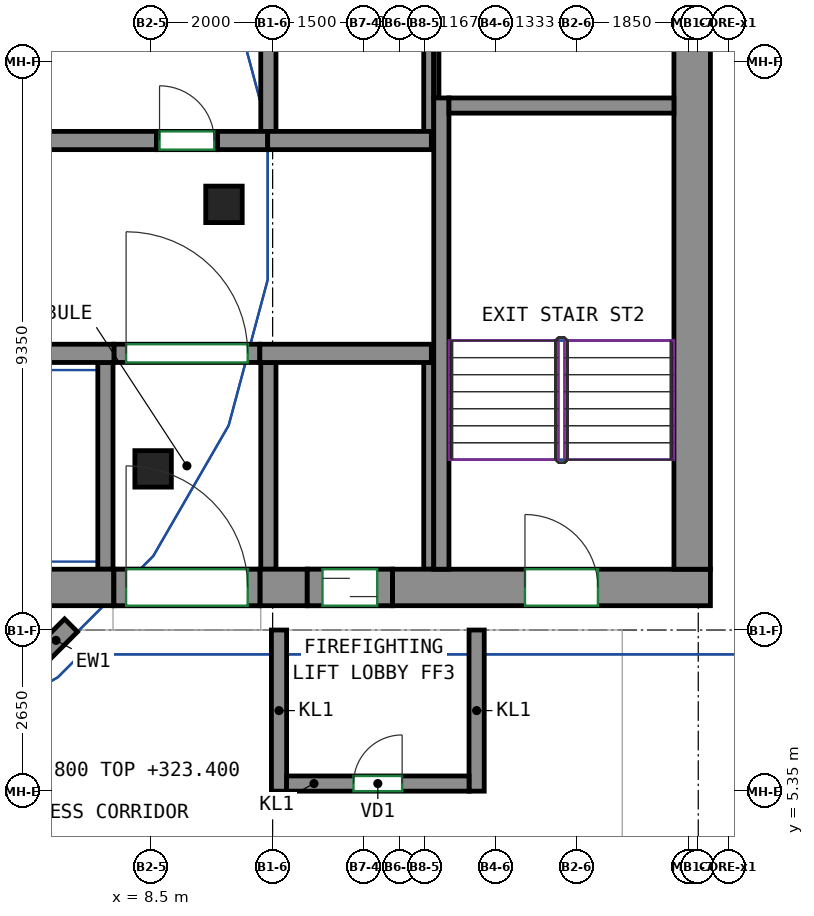
"""IFC4 building model, lengths in metres.
Left out: names, types, materials, properties, quantities, classifications, styles, units other than length and angle.
Written with IfcOpenShell. Run it as: python <this file> out.ifc"""

import sys

from ifc_helpers import new_model, si_unit, direction, frame, frame_2d, origin, origin_2d, place, context, subcontext, project, spatial, rectangle, extrude, source, transform, mapped, element, fill, save


model = new_model("IFC4")
c1 = context("Model", 3, precision=1e-05, world=origin(), true_north=direction((0.0, 1.0)))
c2 = subcontext(c1, "Body", "Model", "MODEL_VIEW")
j1 = project(units=[si_unit("LENGTHUNIT", "METRE"), si_unit("PLANEANGLEUNIT", "RADIAN")], contexts=[c1])
p1 = place(None, origin())
s1 = spatial("IfcSite", under=j1, at=p1, CompositionType="ELEMENT")
p2 = place(p1, origin())
s2 = spatial("IfcBuilding", under=s1, at=p2, CompositionType="ELEMENT")
p3 = place(p2, frame((0.0, 0.0, 318.8)))
s3 = spatial("IfcBuildingStorey", under=s2, at=p3, CompositionType="ELEMENT", Elevation=318.8)
m1 = source(origin(), c2, "Body", "SweptSolid", [
    extrude(rectangle(XDim=0.6, YDim=0.6, at=origin_2d()), origin(), (0.0, 0.0, 1.0), 4.6),
])
for number, where, z_axis, x_axis in (
    (1, (9.7, 15.0, 0.0), (0.0, 0.0, 1.0), (1.0, 0.0, 0.0)),
    (2, (8.534, 10.65, 0.0), (0.0, 0.0, 1.0), (1.0, 0.0, 0.0)),
):
    element("IfcColumn", number, at=place(p3, frame(where, z_axis=z_axis, x_axis=x_axis)), inside=s3, PredefinedType="COLUMN", context=c2, shape_type="MappedRepresentation", body=[
        mapped(m1, transform((0.0, 0.0, 0.0))),
    ])
m2 = source(origin(), c2, "Body", "SweptSolid", [
    extrude(rectangle(XDim=14.18, YDim=0.6, at=frame_2d((7.09, 0.0))), origin(), (0.0, 0.0, 1.0), 4.6),
])
p4 = place(p3, frame((-6.29, 8.7, 0.0), z_axis=(0.0, 0.0, 1.0), x_axis=(1.0, 0.0, 0.0)))
e3 = element("IfcWall", 3, at=p4, inside=s3, PredefinedType="SHEAR", context=c2, shape_type="MappedRepresentation", body=[
    mapped(m2, transform((0.0, 0.0, 0.0))),
])
m3 = source(origin(), c2, "Body", "SweptSolid", [
    extrude(rectangle(XDim=0.78, YDim=0.6, at=frame_2d((0.39, 0.0))), origin(), (0.0, 0.0, 1.0), 5.0),
])
p5 = place(p3, frame((10.29, 8.7, -0.4), z_axis=(0.0, 0.0, 1.0), x_axis=(1.0, 0.0, 0.0)))
e4 = element("IfcWall", 4, at=p5, inside=s3, PredefinedType="SHEAR", context=c2, shape_type="MappedRepresentation", body=[
    mapped(m3, transform((0.0, 0.0, 0.0))),
])
m4 = source(origin(), c2, "Body", "SweptSolid", [
    extrude(rectangle(XDim=5.23, YDim=0.6, at=frame_2d((2.615, 0.0))), origin(), (0.0, 0.0, 1.0), 5.0),
])
p6 = place(p3, frame((12.47, 8.7, -0.4), z_axis=(0.0, 0.0, 1.0), x_axis=(1.0, 0.0, 0.0)))
e5 = element("IfcWall", 5, at=p6, inside=s3, PredefinedType="SHEAR", context=c2, shape_type="MappedRepresentation", body=[
    mapped(m4, transform((0.0, 0.0, 0.0))),
])
p7 = place(p6, frame((2.18, 0.0, 0.4)))
e6 = element("IfcOpeningElement", 6, at=p7, cuts=e5, PredefinedType="OPENING", context=c2, shape_type="SweptSolid", body=[
    extrude(rectangle(XDim=1.2, YDim=2.1, at=frame_2d((0.6, 1.05))), frame((0.0, 0.31, 0.0), z_axis=(0.0, -1.0, 0.0), x_axis=(1.0, 0.0, 0.0)), (0.0, 0.0, 1.0), 0.62),
])
m5 = source(origin(), c2, "Body", "SweptSolid", [
    extrude(rectangle(XDim=12.0, YDim=0.6, at=frame_2d((6.0, 0.0))), origin(), (0.0, 0.0, 1.0), 5.0),
])
p8 = place(p3, frame((17.4, 9.0, -0.4), z_axis=(0.0, 0.0, 1.0), x_axis=(0.0, 1.0, 0.0)))
e7 = element("IfcWall", 7, at=p8, inside=s3, PredefinedType="SHEAR", context=c2, shape_type="MappedRepresentation", body=[
    mapped(m5, transform((0.0, 0.0, 0.0))),
])
m6 = source(origin(), c2, "Body", "SweptSolid", [
    extrude(rectangle(XDim=7.75, YDim=0.25, at=frame_2d((3.875, 0.0))), origin(), (0.0, 0.0, 1.0), 5.0),
])
p9 = place(p3, frame((13.275, 9.0, -0.4), z_axis=(0.0, 0.0, 1.0), x_axis=(0.0, 1.0, 0.0)))
e8 = element("IfcWall", 8, at=p9, inside=s3, PredefinedType="SHEAR", context=c2, shape_type="MappedRepresentation", body=[
    mapped(m6, transform((0.0, 0.0, 0.0))),
])
m7 = source(origin(), c2, "Body", "SweptSolid", [
    extrude(rectangle(XDim=3.7, YDim=0.25, at=frame_2d((1.85, 0.0))), origin(), (0.0, 0.0, 1.0), 5.0),
])
p10 = place(p3, frame((13.4, 16.625, -0.4), z_axis=(0.0, 0.0, 1.0), x_axis=(1.0, 0.0, 0.0)))
e9 = element("IfcWall", 9, at=p10, inside=s3, PredefinedType="SHEAR", context=c2, shape_type="MappedRepresentation", body=[
    mapped(m7, transform((0.0, 0.0, 0.0))),
])
m8 = source(origin(), c2, "Body", "SweptSolid", [
    extrude(rectangle(XDim=15.984, YDim=0.3, at=frame_2d((7.992, 0.0))), origin(), (0.0, 0.0, 1.0), 4.6),
])
p11 = place(p3, frame((-8.094, 12.55, 0.0), z_axis=(0.0, 0.0, 1.0), x_axis=(1.0, 0.0, 0.0)))
e10 = element("IfcWall", 10, at=p11, inside=s3, PredefinedType="SHEAR", context=c2, shape_type="MappedRepresentation", body=[
    mapped(m8, transform((0.0, 0.0, 0.0))),
])
m9 = source(origin(), c2, "Body", "SweptSolid", [
    extrude(rectangle(XDim=2.82, YDim=0.3, at=frame_2d((1.41, 0.0))), origin(), (0.0, 0.0, 1.0), 5.0),
])
p12 = place(p3, frame((10.29, 12.55, -0.4), z_axis=(0.0, 0.0, 1.0), x_axis=(1.0, 0.0, 0.0)))
e11 = element("IfcWall", 11, at=p12, inside=s3, PredefinedType="SHEAR", context=c2, shape_type="MappedRepresentation", body=[
    mapped(m9, transform((0.0, 0.0, 0.0))),
])
m10 = source(origin(), c2, "Body", "SweptSolid", [
    extrude(rectangle(XDim=17.009, YDim=0.3, at=frame_2d((8.504, 0.0))), origin(), (0.0, 0.0, 1.0), 4.6),
])
p13 = place(p3, frame((-8.419, 16.05, 0.0), z_axis=(0.0, 0.0, 1.0), x_axis=(1.0, 0.0, 0.0)))
e12 = element("IfcWall", 12, at=p13, inside=s3, PredefinedType="SHEAR", context=c2, shape_type="MappedRepresentation", body=[
    mapped(m10, transform((0.0, 0.0, 0.0))),
])
m11 = source(origin(), c2, "Body", "SweptSolid", [
    extrude(rectangle(XDim=0.829, YDim=0.3, at=frame_2d((0.414, 0.0))), origin(), (0.0, 0.0, 1.0), 4.6),
])
p14 = place(p3, frame((9.59, 16.05, 0.0), z_axis=(0.0, 0.0, 1.0), x_axis=(1.0, 0.0, 0.0)))
e13 = element("IfcWall", 13, at=p14, inside=s3, PredefinedType="SHEAR", context=c2, shape_type="MappedRepresentation", body=[
    mapped(m11, transform((0.0, 0.0, 0.0))),
])
m12 = source(origin(), c2, "Body", "SweptSolid", [
    extrude(rectangle(XDim=2.691, YDim=0.3, at=frame_2d((1.346, 0.0))), origin(), (0.0, 0.0, 1.0), 5.0),
])
p15 = place(p3, frame((10.419, 16.05, -0.4), z_axis=(0.0, 0.0, 1.0), x_axis=(1.0, 0.0, 0.0)))
e14 = element("IfcWall", 14, at=p15, inside=s3, PredefinedType="SHEAR", context=c2, shape_type="MappedRepresentation", body=[
    mapped(m12, transform((0.0, 0.0, 0.0))),
])
m13 = source(origin(), c2, "Body", "SweptSolid", [
    extrude(rectangle(XDim=2.4, YDim=0.6, at=frame_2d((1.2, 0.0))), origin(), (0.0, 0.0, 1.0), 0.4),
])
p16 = place(p3, frame((7.89, 8.7, 4.2), z_axis=(0.0, 0.0, 1.0), x_axis=(1.0, 0.0, 0.0)))
e15 = element("IfcWall", 15, at=p16, inside=s3, PredefinedType="SHEAR", context=c2, shape_type="MappedRepresentation", body=[
    mapped(m13, transform((0.0, 0.0, 0.0))),
])
m14 = source(origin(), c2, "Body", "SweptSolid", [
    extrude(rectangle(XDim=1.4, YDim=0.6, at=frame_2d((0.7, 0.0))), origin(), (0.0, 0.0, 1.0), 0.65),
])
p17 = place(p3, frame((11.07, 8.7, 3.95), z_axis=(0.0, 0.0, 1.0), x_axis=(1.0, 0.0, 0.0)))
e16 = element("IfcWall", 16, at=p17, inside=s3, PredefinedType="SHEAR", context=c2, shape_type="MappedRepresentation", body=[
    mapped(m14, transform((0.0, 0.0, 0.0))),
])
m15 = source(origin(), c2, "Body", "SweptSolid", [
    extrude(rectangle(XDim=1.0, YDim=0.3, at=frame_2d((0.5, 0.0))), origin(), (0.0, 0.0, 1.0), 1.35),
])
p18 = place(p3, frame((8.59, 16.05, 3.25), z_axis=(0.0, 0.0, 1.0), x_axis=(1.0, 0.0, 0.0)))
e17 = element("IfcWall", 17, at=p18, inside=s3, PredefinedType="SHEAR", context=c2, shape_type="MappedRepresentation", body=[
    mapped(m15, transform((0.0, 0.0, 0.0))),
])
m16 = source(origin(), c2, "Body", "SweptSolid", [
    extrude(rectangle(XDim=0.697, YDim=0.3, at=frame_2d((0.349, 0.0))), origin(), (0.0, 0.0, 1.0), 1.2),
])
p19 = place(p3, frame((6.691, 7.583, 0.0), z_axis=(0.0, 0.0, 1.0), x_axis=(0.706931689754, 0.707281829274, 0.0)))
e18 = element("IfcWall", 18, at=p19, inside=s3, PredefinedType="SOLIDWALL", context=c2, shape_type="MappedRepresentation", body=[
    mapped(m16, transform((0.0, 0.0, 0.0))),
])
m17 = source(origin(), c2, "Body", "SweptSolid", [
    extrude(rectangle(XDim=2.4, YDim=0.3, at=frame_2d((1.2, 0.0))), origin(), (0.0, 0.0, 1.0), 4.6),
])
p20 = place(p3, frame((7.89, 12.55, 0.0), z_axis=(0.0, 0.0, 1.0), x_axis=(1.0, 0.0, 0.0)))
e19 = element("IfcWall", 19, at=p20, inside=s3, PredefinedType="PARTITIONING", context=c2, shape_type="MappedRepresentation", body=[
    mapped(m17, transform((0.0, 0.0, 0.0))),
])
p21 = place(p20, frame((0.2, 0.0, 0.0)))
e20 = element("IfcOpeningElement", 20, at=p21, cuts=e19, PredefinedType="OPENING", context=c2, shape_type="SweptSolid", body=[
    extrude(rectangle(XDim=2.0, YDim=2.1, at=frame_2d((1.0, 1.05))), frame((0.0, 0.16, 0.0), z_axis=(0.0, -1.0, 0.0), x_axis=(1.0, 0.0, 0.0)), (0.0, 0.0, 1.0), 0.32),
])
m18 = source(origin(), c2, "Body", "SweptSolid", [
    extrude(rectangle(XDim=2.65, YDim=0.25, at=frame_2d((1.325, 0.0))), origin(), (0.0, 0.0, 1.0), 4.6),
])
for number, where, z_axis, x_axis in (
    (21, (10.605, 5.35, 0.0), (0.0, 0.0, 1.0), (0.0, 1.0, 0.0)),
    (22, (13.855, 5.35, 0.0), (0.0, 0.0, 1.0), (0.0, 1.0, 0.0)),
):
    element("IfcWall", number, at=place(p3, frame(where, z_axis=z_axis, x_axis=x_axis)), inside=s3, PredefinedType="PARTITIONING", context=c2, shape_type="MappedRepresentation", body=[
        mapped(m18, transform((0.0, 0.0, 0.0))),
    ])
m19 = source(origin(), c2, "Body", "SweptSolid", [
    extrude(rectangle(XDim=3.0, YDim=0.25, at=frame_2d((1.5, 0.0))), origin(), (0.0, 0.0, 1.0), 4.6),
])
p22 = place(p3, frame((10.73, 5.475, 0.0), z_axis=(0.0, 0.0, 1.0), x_axis=(1.0, 0.0, 0.0)))
e23 = element("IfcWall", 23, at=p22, inside=s3, PredefinedType="PARTITIONING", context=c2, shape_type="MappedRepresentation", body=[
    mapped(m19, transform((0.0, 0.0, 0.0))),
])
p23 = place(p22, frame((1.1, 0.0, 0.0)))
e24 = element("IfcOpeningElement", 24, at=p23, cuts=e23, PredefinedType="OPENING", context=c2, shape_type="SweptSolid", body=[
    extrude(rectangle(XDim=0.8, YDim=2.0, at=frame_2d((0.4, 1.0))), frame((0.0, 0.135, 0.0), z_axis=(0.0, -1.0, 0.0), x_axis=(1.0, 0.0, 0.0)), (0.0, 0.0, 1.0), 0.27),
])
m20 = source(origin(), c2, "Body", "SweptSolid", [
    extrude(rectangle(XDim=3.275, YDim=0.165, at=frame_2d((1.638, 0.0))), origin(), (0.0, 0.0, 1.0), 4.6),
])
p24 = place(p3, frame((13.067, 16.2, 0.0), z_axis=(0.0, 0.0, 1.0), x_axis=(0.0, 1.0, 0.0)))
e25 = element("IfcWall", 25, at=p24, inside=s3, PredefinedType="PARTITIONING", context=c2, shape_type="MappedRepresentation", body=[
    mapped(m20, transform((0.0, 0.0, 0.0))),
])
m21 = source(origin(), c2, "Body", "SweptSolid", [
    extrude(rectangle(XDim=3.275, YDim=0.25, at=frame_2d((1.638, 0.0))), origin(), (0.0, 0.0, 1.0), 4.6),
])
p25 = place(p3, frame((10.43, 16.2, 0.0), z_axis=(0.0, 0.0, 1.0), x_axis=(0.0, 1.0, 0.0)))
e26 = element("IfcWall", 26, at=p25, inside=s3, PredefinedType="PARTITIONING", context=c2, shape_type="MappedRepresentation", body=[
    mapped(m21, transform((0.0, 0.0, 0.0))),
])
m22 = source(origin(), c2, "Body", "SweptSolid", [
    extrude(rectangle(XDim=2.725, YDim=0.085, at=frame_2d((1.363, 0.0))), origin(), (0.0, 0.0, 1.0), 4.6),
])
p26 = place(p3, frame((13.192, 16.75, 0.0), z_axis=(0.0, 0.0, 1.0), x_axis=(0.0, 1.0, 0.0)))
e27 = element("IfcWall", 27, at=p26, inside=s3, PredefinedType="PARTITIONING", context=c2, shape_type="MappedRepresentation", body=[
    mapped(m22, transform((0.0, 0.0, 0.0))),
])
m23 = source(origin(), c2, "Body", "SweptSolid", [
    extrude(rectangle(XDim=3.4, YDim=0.25, at=frame_2d((1.7, 0.0))), origin(), (0.0, 0.0, 1.0), 4.6),
])
p27 = place(p3, frame((10.43, 9.0, 0.0), z_axis=(0.0, 0.0, 1.0), x_axis=(0.0, 1.0, 0.0)))
e28 = element("IfcWall", 28, at=p27, inside=s3, PredefinedType="PARTITIONING", context=c2, shape_type="MappedRepresentation", body=[
    mapped(m23, transform((0.0, 0.0, 0.0))),
])
m24 = source(origin(), c2, "Body", "SweptSolid", [
    extrude(rectangle(XDim=3.4, YDim=0.165, at=frame_2d((1.7, 0.0))), origin(), (0.0, 0.0, 1.0), 4.6),
])
p28 = place(p3, frame((13.067, 9.0, 0.0), z_axis=(0.0, 0.0, 1.0), x_axis=(0.0, 1.0, 0.0)))
e29 = element("IfcWall", 29, at=p28, inside=s3, PredefinedType="PARTITIONING", context=c2, shape_type="MappedRepresentation", body=[
    mapped(m24, transform((0.0, 0.0, 0.0))),
])
p29 = place(p3, frame((7.75, 9.0, 0.0), z_axis=(0.0, 0.0, 1.0), x_axis=(0.0, 1.0, 0.0)))
e30 = element("IfcWall", 30, at=p29, inside=s3, PredefinedType="PARTITIONING", context=c2, shape_type="MappedRepresentation", body=[
    mapped(m23, transform((0.0, 0.0, 0.0))),
])
m25 = source(origin(), c2, "Body", "SweptSolid", [
    extrude(rectangle(XDim=2.4, YDim=0.6, at=frame_2d((1.2, 0.0))), origin(), (0.0, 0.0, 1.0), 2.7),
])
p30 = place(p3, frame((7.89, 8.7, 0.0), z_axis=(0.0, 0.0, 1.0), x_axis=(1.0, 0.0, 0.0)))
e31 = element("IfcWall", 31, at=p30, inside=s3, PredefinedType="PARTITIONING", context=c2, shape_type="MappedRepresentation", body=[
    mapped(m25, transform((0.0, 0.0, 0.0))),
])
p31 = place(p30, frame((0.2, 0.0, 0.0)))
e32 = element("IfcOpeningElement", 32, at=p31, cuts=e31, PredefinedType="OPENING", context=c2, shape_type="SweptSolid", body=[
    extrude(rectangle(XDim=2.0, YDim=2.1, at=frame_2d((1.0, 1.05))), frame((0.0, 0.31, 0.0), z_axis=(0.0, -1.0, 0.0), x_axis=(1.0, 0.0, 0.0)), (0.0, 0.0, 1.0), 0.62),
])
m26 = source(origin(), c2, "Body", "SweptSolid", [
    extrude(rectangle(XDim=1.4, YDim=0.6, at=frame_2d((0.7, 0.0))), origin(), (0.0, 0.0, 1.0), 2.7),
])
p32 = place(p3, frame((11.07, 8.7, 0.0), z_axis=(0.0, 0.0, 1.0), x_axis=(1.0, 0.0, 0.0)))
e33 = element("IfcWall", 33, at=p32, inside=s3, PredefinedType="PARTITIONING", context=c2, shape_type="MappedRepresentation", body=[
    mapped(m26, transform((0.0, 0.0, 0.0))),
])
p33 = place(p32, frame((0.25, 0.0, 0.0)))
e34 = element("IfcOpeningElement", 34, at=p33, cuts=e33, PredefinedType="OPENING", context=c2, shape_type="SweptSolid", body=[
    extrude(rectangle(XDim=0.9, YDim=2.1, at=frame_2d((0.45, 1.05))), frame((0.0, 0.31, 0.0), z_axis=(0.0, -1.0, 0.0), x_axis=(1.0, 0.0, 0.0)), (0.0, 0.0, 1.0), 0.62),
])
m27 = source(origin(), c2, "Body", "SweptSolid", [
    extrude(rectangle(XDim=1.0, YDim=0.3, at=frame_2d((0.5, 0.0))), origin(), (0.0, 0.0, 1.0), 2.4),
])
p34 = place(p3, frame((8.59, 16.05, 0.0), z_axis=(0.0, 0.0, 1.0), x_axis=(1.0, 0.0, 0.0)))
e35 = element("IfcWall", 35, at=p34, inside=s3, PredefinedType="PARTITIONING", context=c2, shape_type="MappedRepresentation", body=[
    mapped(m27, transform((0.0, 0.0, 0.0))),
])
p35 = place(p34, frame((0.05, 0.0, 0.0)))
e36 = element("IfcOpeningElement", 36, at=p35, cuts=e35, PredefinedType="OPENING", context=c2, shape_type="SweptSolid", body=[
    extrude(rectangle(XDim=0.9, YDim=2.1, at=frame_2d((0.45, 1.05))), frame((0.0, 0.16, 0.0), z_axis=(0.0, -1.0, 0.0), x_axis=(1.0, 0.0, 0.0)), (0.0, 0.0, 1.0), 0.32),
])
p36 = place(p21, origin())
e37 = element("IfcDoor", 37, at=p36, inside=s3, OperationType="DOUBLE_DOOR_SINGLE_SWING", PredefinedType="DOOR", context=c2, shape_type="SweptSolid", body=[
    extrude(rectangle(XDim=2.0, YDim=2.1, at=frame_2d((1.0, 1.05))), frame((0.0, 0.025, 0.0), z_axis=(0.0, -1.0, 0.0), x_axis=(1.0, 0.0, 0.0)), (0.0, 0.0, 1.0), 0.05),
])
fill(e20, e37)
p37 = place(p31, origin())
e38 = element("IfcDoor", 38, at=p37, inside=s3, OperationType="DOUBLE_DOOR_SINGLE_SWING", PredefinedType="DOOR", context=c2, shape_type="SweptSolid", body=[
    extrude(rectangle(XDim=2.0, YDim=2.1, at=frame_2d((1.0, 1.05))), frame((0.0, 0.205, 0.0), z_axis=(0.0, -1.0, 0.0), x_axis=(1.0, 0.0, 0.0)), (0.0, 0.0, 1.0), 0.05),
])
fill(e32, e38)
p38 = place(p23, origin())
e39 = element("IfcDoor", 39, at=p38, inside=s3, OperationType="SINGLE_SWING_RIGHT", PredefinedType="DOOR", context=c2, shape_type="SweptSolid", body=[
    extrude(rectangle(XDim=0.8, YDim=2.0, at=frame_2d((0.4, 1.0))), frame((0.0, 0.025, 0.0), z_axis=(0.0, -1.0, 0.0), x_axis=(1.0, 0.0, 0.0)), (0.0, 0.0, 1.0), 0.05),
])
fill(e24, e39)
p39 = place(p33, origin())
e40 = element("IfcDoor", 40, at=p39, inside=s3, OperationType="SLIDING_TO_LEFT", PredefinedType="DOOR", context=c2, shape_type="SweptSolid", body=[
    extrude(rectangle(XDim=0.9, YDim=2.1, at=frame_2d((0.45, 1.05))), frame((0.0, 0.205, 0.0), z_axis=(0.0, -1.0, 0.0), x_axis=(1.0, 0.0, 0.0)), (0.0, 0.0, 1.0), 0.05),
])
fill(e34, e40)
p40 = place(p35, origin())
e41 = element("IfcDoor", 41, at=p40, inside=s3, OperationType="SINGLE_SWING_LEFT", PredefinedType="DOOR", context=c2, shape_type="SweptSolid", body=[
    extrude(rectangle(XDim=0.9, YDim=2.1, at=frame_2d((0.45, 1.05))), frame((0.0, 0.025, 0.0), z_axis=(0.0, -1.0, 0.0), x_axis=(1.0, 0.0, 0.0)), (0.0, 0.0, 1.0), 0.05),
])
fill(e36, e41)
p41 = place(p7, origin())
e42 = element("IfcDoor", 42, at=p41, inside=s3, OperationType="DOUBLE_DOOR_SINGLE_SWING", PredefinedType="DOOR", context=c2, shape_type="SweptSolid", body=[
    extrude(rectangle(XDim=1.2, YDim=2.1, at=frame_2d((0.6, 1.05))), frame((0.0, 0.205, 0.0), z_axis=(0.0, -1.0, 0.0), x_axis=(1.0, 0.0, 0.0)), (0.0, 0.0, 1.0), 0.05),
])
fill(e6, e42)
save(model, sys.argv[1])
